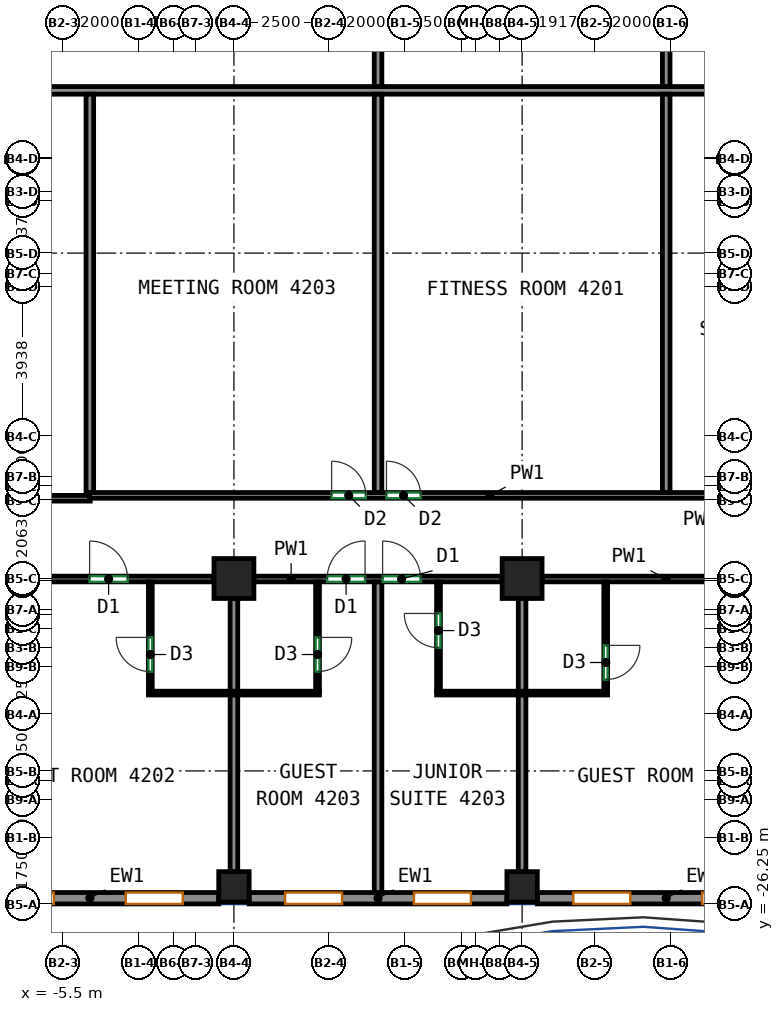
"""IFC4 building model, lengths in metres.
Left out: names, types, materials, properties, quantities, classifications, styles, units other than length and angle.
Written with IfcOpenShell. Run it as: python <this file> out.ifc"""

import sys

from ifc_helpers import new_model, si_unit, direction, frame, frame_2d, origin, origin_2d, place, context, subcontext, project, spatial, rectangle, extrude, source, transform, mapped, element, fill, save


model = new_model("IFC4")
c1 = context("Model", 3, precision=1e-05, world=origin(), true_north=direction((0.0, 1.0)))
c2 = subcontext(c1, "Body", "Model", "MODEL_VIEW")
j1 = project(units=[si_unit("LENGTHUNIT", "METRE"), si_unit("PLANEANGLEUNIT", "RADIAN")], contexts=[c1])
p1 = place(None, origin())
s1 = spatial("IfcSite", under=j1, at=p1, CompositionType="ELEMENT")
p2 = place(p1, origin())
s2 = spatial("IfcBuilding", under=s1, at=p2, CompositionType="ELEMENT")
p3 = place(p2, frame((0.0, 0.0, 178.7)))
s3 = spatial("IfcBuildingStorey", under=s2, at=p3, CompositionType="ELEMENT", Elevation=178.7)
m1 = source(origin(), c2, "Body", "SweptSolid", [
    extrude(rectangle(XDim=0.8, YDim=0.8, at=origin_2d()), origin(), (0.0, 0.0, 1.0), 3.12),
])
p4 = place(p3, frame((-1.0, -25.8, 0.0), z_axis=(0.0, 0.0, 1.0), x_axis=(1.0, 0.0, 0.0)))
e1 = element("IfcColumn", 1, at=p4, inside=s3, PredefinedType="COLUMN", context=c2, shape_type="MappedRepresentation", body=[
    mapped(m1, transform((0.0, 0.0, 0.0))),
])
m2 = source(origin(), c2, "Body", "SweptSolid", [
    extrude(rectangle(XDim=1.05, YDim=1.05, at=origin_2d()), origin(), (0.0, 0.0, 1.0), 3.12),
])
p5 = place(p3, frame((-1.0, -17.688, 0.0), z_axis=(0.0, 0.0, 1.0), x_axis=(1.0, 0.0, 0.0)))
e2 = element("IfcColumn", 2, at=p5, inside=s3, PredefinedType="COLUMN", context=c2, shape_type="MappedRepresentation", body=[
    mapped(m2, transform((0.0, 0.0, 0.0))),
])
p6 = place(p3, frame((6.583, -25.8, 0.0), z_axis=(0.0, 0.0, 1.0), x_axis=(1.0, 0.0, 0.0)))
e3 = element("IfcColumn", 3, at=p6, inside=s3, PredefinedType="COLUMN", context=c2, shape_type="MappedRepresentation", body=[
    mapped(m1, transform((0.0, 0.0, 0.0))),
])
p7 = place(p3, frame((6.583, -17.688, 0.0), z_axis=(0.0, 0.0, 1.0), x_axis=(1.0, 0.0, 0.0)))
e4 = element("IfcColumn", 4, at=p7, inside=s3, PredefinedType="COLUMN", context=c2, shape_type="MappedRepresentation", body=[
    mapped(m2, transform((0.0, 0.0, 0.0))),
])
m3 = source(origin(), c2, "Body", "SweptSolid", [
    extrude(rectangle(XDim=6.783, YDim=0.3, at=frame_2d((3.392, 0.0))), origin(), (0.0, 0.0, 1.0), 3.12),
])
p8 = place(p3, frame((-8.183, -26.1, 0.0), z_axis=(0.0, 0.0, 1.0), x_axis=(1.0, 0.0, 0.0)))
e5 = element("IfcWall", 5, at=p8, inside=s3, PredefinedType="SOLIDWALL", context=c2, shape_type="MappedRepresentation", body=[
    mapped(m3, transform((0.0, 0.0, 0.0))),
])
p9 = place(p8, frame((0.946, 0.0, 0.85)))
e6 = element("IfcOpeningElement", 6, at=p9, cuts=e5, PredefinedType="OPENING", context=c2, shape_type="SweptSolid", body=[
    extrude(rectangle(XDim=1.5, YDim=1.95, at=frame_2d((0.75, 0.975))), frame((0.0, 0.16, 0.0), z_axis=(0.0, -1.0, 0.0), x_axis=(1.0, 0.0, 0.0)), (0.0, 0.0, 1.0), 0.32),
])
p10 = place(p8, frame((4.337, 0.0, 0.85)))
e7 = element("IfcOpeningElement", 7, at=p10, cuts=e5, PredefinedType="OPENING", context=c2, shape_type="SweptSolid", body=[
    extrude(rectangle(XDim=1.5, YDim=1.95, at=frame_2d((0.75, 0.975))), frame((0.0, 0.16, 0.0), z_axis=(0.0, -1.0, 0.0), x_axis=(1.0, 0.0, 0.0)), (0.0, 0.0, 1.0), 0.32),
])
p11 = place(p3, frame((-0.6, -26.1, 0.0), z_axis=(0.0, 0.0, 1.0), x_axis=(1.0, 0.0, 0.0)))
e8 = element("IfcWall", 8, at=p11, inside=s3, PredefinedType="SOLIDWALL", context=c2, shape_type="MappedRepresentation", body=[
    mapped(m3, transform((0.0, 0.0, 0.0))),
])
p12 = place(p11, frame((0.946, 0.0, 0.85)))
e9 = element("IfcOpeningElement", 9, at=p12, cuts=e8, PredefinedType="OPENING", context=c2, shape_type="SweptSolid", body=[
    extrude(rectangle(XDim=1.5, YDim=1.95, at=frame_2d((0.75, 0.975))), frame((0.0, 0.16, 0.0), z_axis=(0.0, -1.0, 0.0), x_axis=(1.0, 0.0, 0.0)), (0.0, 0.0, 1.0), 0.32),
])
p13 = place(p11, frame((4.337, 0.0, 0.85)))
e10 = element("IfcOpeningElement", 10, at=p13, cuts=e8, PredefinedType="OPENING", context=c2, shape_type="SweptSolid", body=[
    extrude(rectangle(XDim=1.5, YDim=1.95, at=frame_2d((0.75, 0.975))), frame((0.0, 0.16, 0.0), z_axis=(0.0, -1.0, 0.0), x_axis=(1.0, 0.0, 0.0)), (0.0, 0.0, 1.0), 0.32),
])
m4 = source(origin(), c2, "Body", "SweptSolid", [
    extrude(rectangle(XDim=6.783, YDim=0.3, at=frame_2d((3.392, 0.0))), origin(), (0.0, 0.0, 1.0), 3.12),
])
p14 = place(p3, frame((6.983, -26.1, 0.0), z_axis=(0.0, 0.0, 1.0), x_axis=(1.0, 0.0, 0.0)))
e11 = element("IfcWall", 11, at=p14, inside=s3, PredefinedType="SOLIDWALL", context=c2, shape_type="MappedRepresentation", body=[
    mapped(m4, transform((0.0, 0.0, 0.0))),
])
p15 = place(p14, frame((0.946, 0.0, 0.85)))
e12 = element("IfcOpeningElement", 12, at=p15, cuts=e11, PredefinedType="OPENING", context=c2, shape_type="SweptSolid", body=[
    extrude(rectangle(XDim=1.5, YDim=1.95, at=frame_2d((0.75, 0.975))), frame((0.0, 0.16, 0.0), z_axis=(0.0, -1.0, 0.0), x_axis=(1.0, 0.0, 0.0)), (0.0, 0.0, 1.0), 0.32),
])
p16 = place(p14, frame((4.338, 0.0, 0.85)))
e13 = element("IfcOpeningElement", 13, at=p16, cuts=e11, PredefinedType="OPENING", context=c2, shape_type="SweptSolid", body=[
    extrude(rectangle(XDim=1.5, YDim=1.95, at=frame_2d((0.75, 0.975))), frame((0.0, 0.16, 0.0), z_axis=(0.0, -1.0, 0.0), x_axis=(1.0, 0.0, 0.0)), (0.0, 0.0, 1.0), 0.32),
])
p17 = place(p3, frame((-8.058, -17.7, 0.0), z_axis=(0.0, 0.0, 1.0), x_axis=(1.0, 0.0, 0.0)))
e14 = element("IfcWall", 14, at=p17, inside=s3, PredefinedType="PARTITIONING", context=c2, shape_type="SweptSolid", body=[
    extrude(rectangle(XDim=6.533, YDim=0.15, at=frame_2d((3.267, 0.0))), origin(), (0.0, 0.0, 1.0), 3.12),
])
p18 = place(p17, frame((3.26, 0.0, 0.0)))
e15 = element("IfcOpeningElement", 15, at=p18, cuts=e14, PredefinedType="OPENING", context=c2, shape_type="SweptSolid", body=[
    extrude(rectangle(XDim=1.0, YDim=2.1, at=frame_2d((0.5, 1.05))), frame((0.0, 0.085, 0.0), z_axis=(0.0, -1.0, 0.0), x_axis=(1.0, 0.0, 0.0)), (0.0, 0.0, 1.0), 0.17),
])
p19 = place(p3, frame((-0.475, -17.7, 0.0), z_axis=(0.0, 0.0, 1.0), x_axis=(1.0, 0.0, 0.0)))
e16 = element("IfcWall", 16, at=p19, inside=s3, PredefinedType="PARTITIONING", context=c2, shape_type="SweptSolid", body=[
    extrude(rectangle(XDim=6.533, YDim=0.15, at=frame_2d((3.267, 0.0))), origin(), (0.0, 0.0, 1.0), 3.12),
])
p20 = place(p19, frame((1.926, 0.0, 0.0)))
e17 = element("IfcOpeningElement", 17, at=p20, cuts=e16, PredefinedType="OPENING", context=c2, shape_type="SweptSolid", body=[
    extrude(rectangle(XDim=1.0, YDim=2.1, at=frame_2d((0.5, 1.05))), frame((0.0, 0.085, 0.0), z_axis=(0.0, -1.0, 0.0), x_axis=(1.0, 0.0, 0.0)), (0.0, 0.0, 1.0), 0.17),
])
p21 = place(p19, frame((3.387, 0.0, 0.0)))
e18 = element("IfcOpeningElement", 18, at=p21, cuts=e16, PredefinedType="OPENING", context=c2, shape_type="SweptSolid", body=[
    extrude(rectangle(XDim=1.0, YDim=2.1, at=frame_2d((0.5, 1.05))), frame((0.0, 0.085, 0.0), z_axis=(0.0, -1.0, 0.0), x_axis=(1.0, 0.0, 0.0)), (0.0, 0.0, 1.0), 0.17),
])
p22 = place(p3, frame((7.108, -17.7, 0.0), z_axis=(0.0, 0.0, 1.0), x_axis=(1.0, 0.0, 0.0)))
e19 = element("IfcWall", 19, at=p22, inside=s3, PredefinedType="PARTITIONING", context=c2, shape_type="SweptSolid", body=[
    extrude(rectangle(XDim=6.534, YDim=0.15, at=frame_2d((3.267, 0.0))), origin(), (0.0, 0.0, 1.0), 3.12),
])
p23 = place(p22, frame((4.722, 0.0, 0.0)))
e20 = element("IfcOpeningElement", 20, at=p23, cuts=e19, PredefinedType="OPENING", context=c2, shape_type="SweptSolid", body=[
    extrude(rectangle(XDim=1.0, YDim=2.1, at=frame_2d((0.5, 1.05))), frame((0.0, 0.085, 0.0), z_axis=(0.0, -1.0, 0.0), x_axis=(1.0, 0.0, 0.0)), (0.0, 0.0, 1.0), 0.17),
])
p24 = place(p3, frame((-4.782, -15.575, 0.0), z_axis=(0.0, 0.0, 1.0), x_axis=(-1.0, 0.0, 0.0)))
e21 = element("IfcWall", 21, at=p24, inside=s3, PredefinedType="PARTITIONING", context=c2, shape_type="SweptSolid", body=[
    extrude(rectangle(XDim=8.768, YDim=0.15, at=frame_2d((4.384, 0.0))), origin(), (0.0, 0.0, 1.0), 3.12),
])
p25 = place(p24, frame((5.348, 0.0, 0.0)))
e22 = element("IfcOpeningElement", 22, at=p25, cuts=e21, PredefinedType="OPENING", context=c2, shape_type="SweptSolid", body=[
    extrude(rectangle(XDim=1.0, YDim=2.1, at=frame_2d((0.5, 1.05))), frame((0.0, 0.085, 0.0), z_axis=(0.0, -1.0, 0.0), x_axis=(1.0, 0.0, 0.0)), (0.0, 0.0, 1.0), 0.17),
])
p26 = place(p3, frame((-4.802, -15.5, 0.0), z_axis=(0.0, 0.0, 1.0), x_axis=(1.0, 0.0, 0.0)))
e23 = element("IfcWall", 23, at=p26, inside=s3, PredefinedType="PARTITIONING", context=c2, shape_type="SweptSolid", body=[
    extrude(rectangle(XDim=21.077, YDim=0.15, at=frame_2d((10.539, 0.0))), origin(), (0.0, 0.0, 1.0), 3.12),
])
p27 = place(p26, frame((6.372, 0.0, 0.0)))
e24 = element("IfcOpeningElement", 24, at=p27, cuts=e23, PredefinedType="OPENING", context=c2, shape_type="SweptSolid", body=[
    extrude(rectangle(XDim=0.9, YDim=2.1, at=frame_2d((0.45, 1.05))), frame((0.0, 0.085, 0.0), z_axis=(0.0, -1.0, 0.0), x_axis=(1.0, 0.0, 0.0)), (0.0, 0.0, 1.0), 0.17),
])
p28 = place(p26, frame((7.815, 0.0, 0.0)))
e25 = element("IfcOpeningElement", 25, at=p28, cuts=e23, PredefinedType="OPENING", context=c2, shape_type="SweptSolid", body=[
    extrude(rectangle(XDim=0.9, YDim=2.1, at=frame_2d((0.45, 1.05))), frame((0.0, 0.085, 0.0), z_axis=(0.0, -1.0, 0.0), x_axis=(1.0, 0.0, 0.0)), (0.0, 0.0, 1.0), 0.17),
])
p29 = place(p3, frame((-3.2, -20.652, 0.0), z_axis=(0.0, 0.0, 1.0), x_axis=(0.0, 1.0, 0.0)))
e26 = element("IfcWall", 26, at=p29, inside=s3, PredefinedType="PARTITIONING", context=c2, shape_type="SweptSolid", body=[
    extrude(rectangle(XDim=2.875, YDim=0.1, at=frame_2d((1.438, 0.0))), origin(), (0.0, 0.0, 1.0), 3.12),
])
p30 = place(p29, frame((0.515, 0.0, 0.0)))
e27 = element("IfcOpeningElement", 27, at=p30, cuts=e26, PredefinedType="OPENING", context=c2, shape_type="SweptSolid", body=[
    extrude(rectangle(XDim=0.9, YDim=2.1, at=frame_2d((0.45, 1.05))), frame((0.0, 0.06, 0.0), z_axis=(0.0, -1.0, 0.0), x_axis=(1.0, 0.0, 0.0)), (0.0, 0.0, 1.0), 0.12),
])
p31 = place(p3, frame((-3.25, -20.702, 0.0), z_axis=(0.0, 0.0, 1.0), x_axis=(1.0, 0.0, 0.0)))
e28 = element("IfcWall", 28, at=p31, inside=s3, PredefinedType="PARTITIONING", context=c2, shape_type="SweptSolid", body=[
    extrude(rectangle(XDim=4.5, YDim=0.1, at=frame_2d((2.25, 0.0))), origin(), (0.0, 0.0, 1.0), 3.12),
])
p32 = place(p3, frame((-1.0, -25.4, 0.0), z_axis=(0.0, 0.0, 1.0), x_axis=(0.0, 1.0, 0.0)))
e29 = element("IfcWall", 29, at=p32, inside=s3, PredefinedType="PARTITIONING", context=c2, shape_type="SweptSolid", body=[
    extrude(rectangle(XDim=4.648, YDim=0.2, at=frame_2d((2.324, 0.0))), origin(), (0.0, 0.0, 1.0), 3.12),
])
p33 = place(p3, frame((-1.0, -20.652, 0.0), z_axis=(0.0, 0.0, 1.0), x_axis=(0.0, 1.0, 0.0)))
e30 = element("IfcWall", 30, at=p33, inside=s3, PredefinedType="PARTITIONING", context=c2, shape_type="SweptSolid", body=[
    extrude(rectangle(XDim=2.44, YDim=0.2, at=frame_2d((1.22, 0.0))), origin(), (0.0, 0.0, 1.0), 3.12),
])
p34 = place(p3, frame((1.2, -17.777, 0.0), z_axis=(0.0, 0.0, 1.0), x_axis=(0.0, -1.0, 0.0)))
e31 = element("IfcWall", 31, at=p34, inside=s3, PredefinedType="PARTITIONING", context=c2, shape_type="SweptSolid", body=[
    extrude(rectangle(XDim=2.875, YDim=0.1, at=frame_2d((1.438, 0.0))), origin(), (0.0, 0.0, 1.0), 3.12),
])
p35 = place(p34, frame((1.46, 0.0, 0.0)))
e32 = element("IfcOpeningElement", 32, at=p35, cuts=e31, PredefinedType="OPENING", context=c2, shape_type="SweptSolid", body=[
    extrude(rectangle(XDim=0.9, YDim=2.1, at=frame_2d((0.45, 1.05))), frame((0.0, 0.06, 0.0), z_axis=(0.0, -1.0, 0.0), x_axis=(1.0, 0.0, 0.0)), (0.0, 0.0, 1.0), 0.12),
])
p36 = place(p3, frame((2.792, -26.0, 0.0), z_axis=(0.0, 0.0, 1.0), x_axis=(0.0, 1.0, 0.0)))
e33 = element("IfcWall", 33, at=p36, inside=s3, PredefinedType="PARTITIONING", context=c2, shape_type="SweptSolid", body=[
    extrude(rectangle(XDim=8.223, YDim=0.2, at=frame_2d((4.111, 0.0))), origin(), (0.0, 0.0, 1.0), 3.12),
])
p37 = place(p3, frame((4.383, -20.652, 0.0), z_axis=(0.0, 0.0, 1.0), x_axis=(0.0, 1.0, 0.0)))
e34 = element("IfcWall", 34, at=p37, inside=s3, PredefinedType="PARTITIONING", context=c2, shape_type="SweptSolid", body=[
    extrude(rectangle(XDim=2.875, YDim=0.1, at=frame_2d((1.438, 0.0))), origin(), (0.0, 0.0, 1.0), 3.12),
])
p38 = place(p37, frame((1.145, 0.0, 0.0)))
e35 = element("IfcOpeningElement", 35, at=p38, cuts=e34, PredefinedType="OPENING", context=c2, shape_type="SweptSolid", body=[
    extrude(rectangle(XDim=0.9, YDim=2.1, at=frame_2d((0.45, 1.05))), frame((0.0, 0.06, 0.0), z_axis=(0.0, -1.0, 0.0), x_axis=(1.0, 0.0, 0.0)), (0.0, 0.0, 1.0), 0.12),
])
p39 = place(p3, frame((4.333, -20.702, 0.0), z_axis=(0.0, 0.0, 1.0), x_axis=(1.0, 0.0, 0.0)))
e36 = element("IfcWall", 36, at=p39, inside=s3, PredefinedType="PARTITIONING", context=c2, shape_type="SweptSolid", body=[
    extrude(rectangle(XDim=4.5, YDim=0.1, at=frame_2d((2.25, 0.0))), origin(), (0.0, 0.0, 1.0), 3.12),
])
p40 = place(p3, frame((6.583, -25.4, 0.0), z_axis=(0.0, 0.0, 1.0), x_axis=(0.0, 1.0, 0.0)))
e37 = element("IfcWall", 37, at=p40, inside=s3, PredefinedType="PARTITIONING", context=c2, shape_type="SweptSolid", body=[
    extrude(rectangle(XDim=4.648, YDim=0.2, at=frame_2d((2.324, 0.0))), origin(), (0.0, 0.0, 1.0), 3.12),
])
p41 = place(p3, frame((6.583, -20.652, 0.0), z_axis=(0.0, 0.0, 1.0), x_axis=(0.0, 1.0, 0.0)))
e38 = element("IfcWall", 38, at=p41, inside=s3, PredefinedType="PARTITIONING", context=c2, shape_type="SweptSolid", body=[
    extrude(rectangle(XDim=2.44, YDim=0.2, at=frame_2d((1.22, 0.0))), origin(), (0.0, 0.0, 1.0), 3.12),
])
p42 = place(p3, frame((8.783, -17.777, 0.0), z_axis=(0.0, 0.0, 1.0), x_axis=(0.0, -1.0, 0.0)))
e39 = element("IfcWall", 39, at=p42, inside=s3, PredefinedType="PARTITIONING", context=c2, shape_type="SweptSolid", body=[
    extrude(rectangle(XDim=2.875, YDim=0.1, at=frame_2d((1.438, 0.0))), origin(), (0.0, 0.0, 1.0), 3.12),
])
p43 = place(p42, frame((1.67, 0.0, 0.0)))
e40 = element("IfcOpeningElement", 40, at=p43, cuts=e39, PredefinedType="OPENING", context=c2, shape_type="SweptSolid", body=[
    extrude(rectangle(XDim=0.9, YDim=2.1, at=frame_2d((0.45, 1.05))), frame((0.0, 0.06, 0.0), z_axis=(0.0, -1.0, 0.0), x_axis=(1.0, 0.0, 0.0)), (0.0, 0.0, 1.0), 0.12),
])
p44 = place(p3, frame((-13.873, -4.843, 0.0), z_axis=(0.0, 0.0, 1.0), x_axis=(1.0, 0.0, 0.0)))
e41 = element("IfcWall", 41, at=p44, inside=s3, PredefinedType="PARTITIONING", context=c2, shape_type="SweptSolid", body=[
    extrude(rectangle(XDim=30.146, YDim=0.2, at=frame_2d((15.073, 0.0))), origin(), (0.0, 0.0, 1.0), 3.12),
])
for number, where, z_axis, x_axis in (
    (42, (2.792, -4.743, 0.0), (0.0, 0.0, 1.0), (0.0, 1.0, 0.0)),
    (43, (10.375, -4.743, 0.0), (0.0, 0.0, 1.0), (0.0, 1.0, 0.0)),
):
    element("IfcWall", number, at=place(p3, frame(where, z_axis=z_axis, x_axis=x_axis)), inside=s3, PredefinedType="PARTITIONING", context=c2, shape_type="SweptSolid", body=[
        extrude(rectangle(XDim=8.366, YDim=0.2, at=frame_2d((4.183, 0.0))), origin(), (0.0, 0.0, 1.0), 3.12),
    ])
for number, where, z_axis, x_axis in (
    (44, (-4.792, -15.423, 0.0), (0.0, 0.0, 1.0), (0.0, 1.0, 0.0)),
    (45, (2.792, -15.423, 0.0), (0.0, 0.0, 1.0), (0.0, 1.0, 0.0)),
    (46, (10.375, -15.423, 0.0), (0.0, 0.0, 1.0), (0.0, 1.0, 0.0)),
):
    element("IfcWall", number, at=place(p3, frame(where, z_axis=z_axis, x_axis=x_axis)), inside=s3, PredefinedType="PARTITIONING", context=c2, shape_type="SweptSolid", body=[
        extrude(rectangle(XDim=10.48, YDim=0.2, at=frame_2d((5.24, 0.0))), origin(), (0.0, 0.0, 1.0), 3.12),
    ])
p45 = place(p9, origin())
e47 = element("IfcWindow", 47, at=p45, inside=s3, PartitioningType="SINGLE_PANEL", PredefinedType="WINDOW", context=c2, shape_type="SweptSolid", body=[
    extrude(rectangle(XDim=1.5, YDim=1.95, at=frame_2d((0.75, 0.975))), frame((0.0, 0.03, 0.0), z_axis=(0.0, -1.0, 0.0), x_axis=(1.0, 0.0, 0.0)), (0.0, 0.0, 1.0), 0.06),
])
fill(e6, e47)
p46 = place(p10, origin())
e48 = element("IfcWindow", 48, at=p46, inside=s3, PartitioningType="SINGLE_PANEL", PredefinedType="WINDOW", context=c2, shape_type="SweptSolid", body=[
    extrude(rectangle(XDim=1.5, YDim=1.95, at=frame_2d((0.75, 0.975))), frame((0.0, 0.03, 0.0), z_axis=(0.0, -1.0, 0.0), x_axis=(1.0, 0.0, 0.0)), (0.0, 0.0, 1.0), 0.06),
])
fill(e7, e48)
p47 = place(p12, origin())
e49 = element("IfcWindow", 49, at=p47, inside=s3, PartitioningType="SINGLE_PANEL", PredefinedType="WINDOW", context=c2, shape_type="SweptSolid", body=[
    extrude(rectangle(XDim=1.5, YDim=1.95, at=frame_2d((0.75, 0.975))), frame((0.0, 0.03, 0.0), z_axis=(0.0, -1.0, 0.0), x_axis=(1.0, 0.0, 0.0)), (0.0, 0.0, 1.0), 0.06),
])
fill(e9, e49)
p48 = place(p13, origin())
e50 = element("IfcWindow", 50, at=p48, inside=s3, PartitioningType="SINGLE_PANEL", PredefinedType="WINDOW", context=c2, shape_type="SweptSolid", body=[
    extrude(rectangle(XDim=1.5, YDim=1.95, at=frame_2d((0.75, 0.975))), frame((0.0, 0.03, 0.0), z_axis=(0.0, -1.0, 0.0), x_axis=(1.0, 0.0, 0.0)), (0.0, 0.0, 1.0), 0.06),
])
fill(e10, e50)
p49 = place(p15, origin())
e51 = element("IfcWindow", 51, at=p49, inside=s3, PartitioningType="SINGLE_PANEL", PredefinedType="WINDOW", context=c2, shape_type="SweptSolid", body=[
    extrude(rectangle(XDim=1.5, YDim=1.95, at=frame_2d((0.75, 0.975))), frame((0.0, 0.03, 0.0), z_axis=(0.0, -1.0, 0.0), x_axis=(1.0, 0.0, 0.0)), (0.0, 0.0, 1.0), 0.06),
])
fill(e12, e51)
p50 = place(p16, origin())
e52 = element("IfcWindow", 52, at=p50, inside=s3, PartitioningType="SINGLE_PANEL", PredefinedType="WINDOW", context=c2, shape_type="SweptSolid", body=[
    extrude(rectangle(XDim=1.5, YDim=1.95, at=frame_2d((0.75, 0.975))), frame((0.0, 0.03, 0.0), z_axis=(0.0, -1.0, 0.0), x_axis=(1.0, 0.0, 0.0)), (0.0, 0.0, 1.0), 0.06),
])
fill(e13, e52)
p51 = place(p43, origin())
e53 = element("IfcDoor", 53, at=p51, inside=s3, OperationType="SINGLE_SWING_LEFT", PredefinedType="DOOR", context=c2, shape_type="SweptSolid", body=[
    extrude(rectangle(XDim=0.9, YDim=2.1, at=frame_2d((0.45, 1.05))), frame((0.0, 0.025, 0.0), z_axis=(0.0, -1.0, 0.0), x_axis=(1.0, 0.0, 0.0)), (0.0, 0.0, 1.0), 0.05),
])
fill(e40, e53)
p52 = place(p30, origin())
e54 = element("IfcDoor", 54, at=p52, inside=s3, OperationType="SINGLE_SWING_RIGHT", PredefinedType="DOOR", context=c2, shape_type="SweptSolid", body=[
    extrude(rectangle(XDim=0.9, YDim=2.1, at=frame_2d((0.45, 1.05))), frame((0.0, 0.025, 0.0), z_axis=(0.0, -1.0, 0.0), x_axis=(1.0, 0.0, 0.0)), (0.0, 0.0, 1.0), 0.05),
])
fill(e27, e54)
p53 = place(p35, origin())
e55 = element("IfcDoor", 55, at=p53, inside=s3, OperationType="SINGLE_SWING_LEFT", PredefinedType="DOOR", context=c2, shape_type="SweptSolid", body=[
    extrude(rectangle(XDim=0.9, YDim=2.1, at=frame_2d((0.45, 1.05))), frame((0.0, 0.025, 0.0), z_axis=(0.0, -1.0, 0.0), x_axis=(1.0, 0.0, 0.0)), (0.0, 0.0, 1.0), 0.05),
])
fill(e32, e55)
p54 = place(p38, origin())
e56 = element("IfcDoor", 56, at=p54, inside=s3, OperationType="SINGLE_SWING_RIGHT", PredefinedType="DOOR", context=c2, shape_type="SweptSolid", body=[
    extrude(rectangle(XDim=0.9, YDim=2.1, at=frame_2d((0.45, 1.05))), frame((0.0, 0.025, 0.0), z_axis=(0.0, -1.0, 0.0), x_axis=(1.0, 0.0, 0.0)), (0.0, 0.0, 1.0), 0.05),
])
fill(e35, e56)
p55 = place(p18, origin())
e57 = element("IfcDoor", 57, at=p55, inside=s3, OperationType="SINGLE_SWING_LEFT", PredefinedType="DOOR", context=c2, shape_type="SweptSolid", body=[
    extrude(rectangle(XDim=1.0, YDim=2.1, at=frame_2d((0.5, 1.05))), frame((0.0, 0.025, 0.0), z_axis=(0.0, -1.0, 0.0), x_axis=(1.0, 0.0, 0.0)), (0.0, 0.0, 1.0), 0.05),
])
fill(e15, e57)
p56 = place(p20, origin())
e58 = element("IfcDoor", 58, at=p56, inside=s3, OperationType="SINGLE_SWING_RIGHT", PredefinedType="DOOR", context=c2, shape_type="SweptSolid", body=[
    extrude(rectangle(XDim=1.0, YDim=2.1, at=frame_2d((0.5, 1.05))), frame((0.0, 0.025, 0.0), z_axis=(0.0, -1.0, 0.0), x_axis=(1.0, 0.0, 0.0)), (0.0, 0.0, 1.0), 0.05),
])
fill(e17, e58)
p57 = place(p21, origin())
e59 = element("IfcDoor", 59, at=p57, inside=s3, OperationType="SINGLE_SWING_LEFT", PredefinedType="DOOR", context=c2, shape_type="SweptSolid", body=[
    extrude(rectangle(XDim=1.0, YDim=2.1, at=frame_2d((0.5, 1.05))), frame((0.0, 0.025, 0.0), z_axis=(0.0, -1.0, 0.0), x_axis=(1.0, 0.0, 0.0)), (0.0, 0.0, 1.0), 0.05),
])
fill(e18, e59)
p58 = place(p27, origin())
e60 = element("IfcDoor", 60, at=p58, inside=s3, OperationType="SINGLE_SWING_LEFT", PredefinedType="DOOR", context=c2, shape_type="SweptSolid", body=[
    extrude(rectangle(XDim=0.9, YDim=2.1, at=frame_2d((0.45, 1.05))), frame((0.0, 0.025, 0.0), z_axis=(0.0, -1.0, 0.0), x_axis=(1.0, 0.0, 0.0)), (0.0, 0.0, 1.0), 0.05),
])
fill(e24, e60)
p59 = place(p28, origin())
e61 = element("IfcDoor", 61, at=p59, inside=s3, OperationType="SINGLE_SWING_LEFT", PredefinedType="DOOR", context=c2, shape_type="SweptSolid", body=[
    extrude(rectangle(XDim=0.9, YDim=2.1, at=frame_2d((0.45, 1.05))), frame((0.0, 0.025, 0.0), z_axis=(0.0, -1.0, 0.0), x_axis=(1.0, 0.0, 0.0)), (0.0, 0.0, 1.0), 0.05),
])
fill(e25, e61)
save(model, sys.argv[1])
